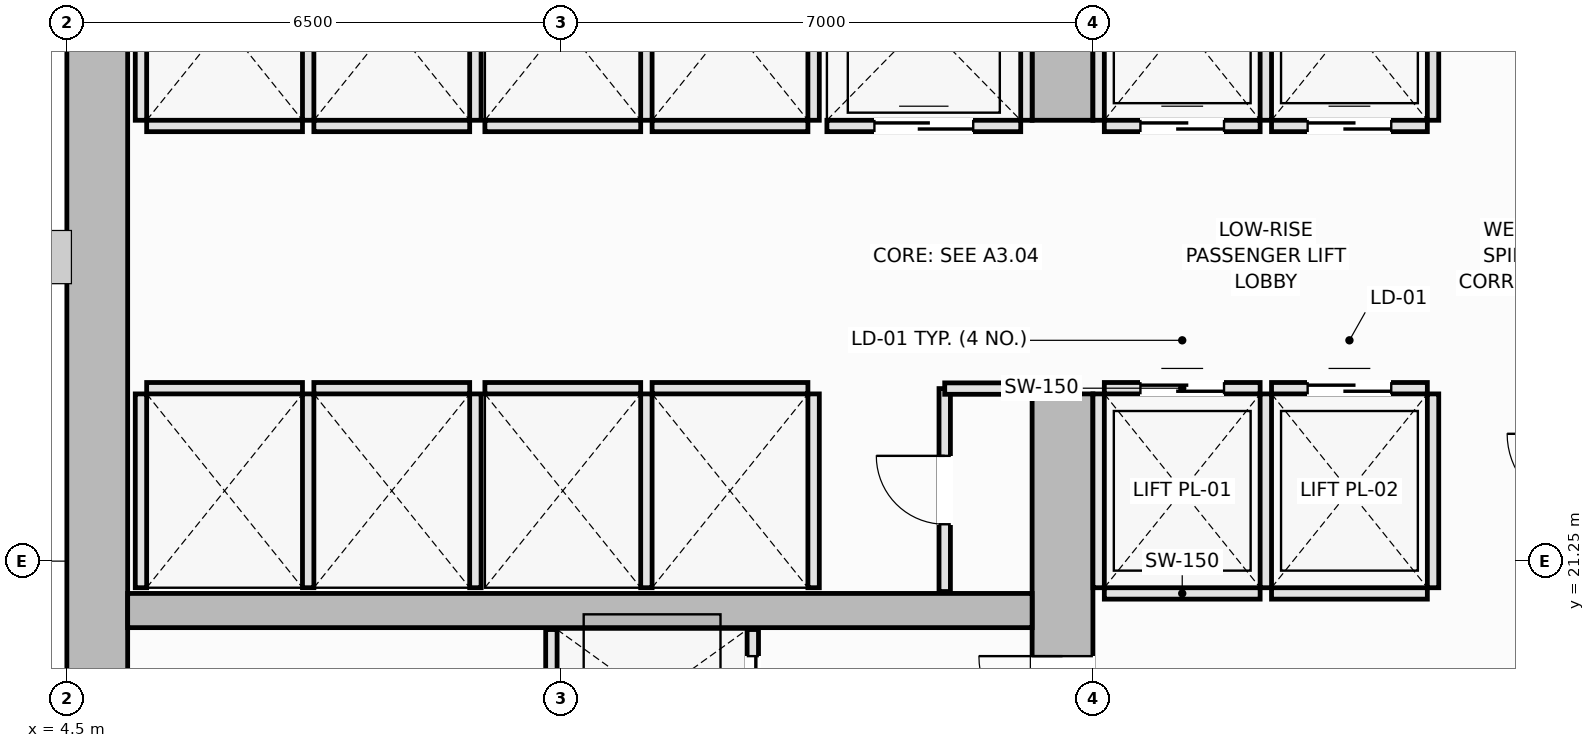
"""IFC4 building model, lengths in metres.
Left out: names, types, materials, properties, quantities, classifications, styles, units other than length and angle.
Written with IfcOpenShell. Run it as: python <this file> out.ifc"""

import sys

from ifc_helpers import new_model, si_unit, direction, frame, frame_2d, origin, place, context, subcontext, project, spatial, rectangle, extrude, element, fill, save


model = new_model("IFC4")
c1 = context("Model", 3, precision=1e-05, world=origin(), true_north=direction((0.0, 1.0)))
c2 = subcontext(c1, "Body", "Model", "MODEL_VIEW")
j1 = project(units=[si_unit("LENGTHUNIT", "METRE"), si_unit("PLANEANGLEUNIT", "RADIAN")], contexts=[c1])
p1 = place(None, origin())
s1 = spatial("IfcSite", under=j1, at=p1, CompositionType="ELEMENT")
p2 = place(p1, origin())
s2 = spatial("IfcBuilding", under=s1, at=p2, CompositionType="ELEMENT")
p3 = place(p2, frame((0.0, 0.0, 57.55)))
s3 = spatial("IfcBuildingStorey", under=s2, at=p3, CompositionType="ELEMENT", Elevation=57.55)
p4 = place(p3, frame((4.9, 14.8, 0.0), z_axis=(0.0, 0.0, 1.0), x_axis=(0.0, 1.0, 0.0)))
e1 = element("IfcWall", 1, at=p4, inside=s3, PredefinedType="SHEAR", context=c2, shape_type="SweptSolid", body=[
    extrude(rectangle(XDim=20.9, YDim=0.8, at=frame_2d((10.45, 0.0))), origin(), (0.0, 0.0, 1.0), 3.55),
])
p5 = place(p3, frame((17.6, 14.8, 0.0), z_axis=(0.0, 0.0, 1.0), x_axis=(0.0, 1.0, 0.0)))
e2 = element("IfcWall", 2, at=p5, inside=s3, PredefinedType="SHEAR", context=c2, shape_type="SweptSolid", body=[
    extrude(rectangle(XDim=8.65, YDim=0.8, at=frame_2d((4.325, 0.0))), origin(), (0.0, 0.0, 1.0), 3.55),
])
p6 = place(p5, frame((4.1, 0.0, 0.0)))
e3 = element("IfcOpeningElement", 3, at=p6, cuts=e2, PredefinedType="OPENING", context=c2, shape_type="SweptSolid", body=[
    extrude(rectangle(XDim=1.1, YDim=2.15, at=frame_2d((0.55, 1.075))), frame((0.0, 0.41, 0.0), z_axis=(0.0, -1.0, 0.0), x_axis=(1.0, 0.0, 0.0)), (0.0, 0.0, 1.0), 0.82),
])
p7 = place(p3, frame((17.6, 27.05, 0.0), z_axis=(0.0, 0.0, 1.0), x_axis=(0.0, 1.0, 0.0)))
e4 = element("IfcWall", 4, at=p7, inside=s3, PredefinedType="SHEAR", context=c2, shape_type="SweptSolid", body=[
    extrude(rectangle(XDim=8.65, YDim=0.8, at=frame_2d((4.325, 0.0))), origin(), (0.0, 0.0, 1.0), 3.55),
])
p8 = place(p7, frame((3.45, 0.0, 0.0)))
e5 = element("IfcOpeningElement", 5, at=p8, cuts=e4, PredefinedType="OPENING", context=c2, shape_type="SweptSolid", body=[
    extrude(rectangle(XDim=1.1, YDim=2.15, at=frame_2d((0.55, 1.075))), frame((0.0, 0.41, 0.0), z_axis=(0.0, -1.0, 0.0), x_axis=(1.0, 0.0, 0.0)), (0.0, 0.0, 1.0), 0.82),
])
p9 = place(p3, frame((5.3, 20.6, 0.0), z_axis=(0.0, 0.0, 1.0), x_axis=(1.0, 0.0, 0.0)))
e6 = element("IfcWall", 6, at=p9, inside=s3, PredefinedType="SHEAR", context=c2, shape_type="SweptSolid", body=[
    extrude(rectangle(XDim=11.9, YDim=0.45, at=frame_2d((5.95, 0.0))), origin(), (0.0, 0.0, 1.0), 3.55),
])
p10 = place(p3, frame((18.15, 20.825, 0.0), z_axis=(0.0, 0.0, 1.0), x_axis=(1.0, 0.0, 0.0)))
e7 = element("IfcWall", 7, at=p10, inside=s3, PredefinedType="PARTITIONING", context=c2, shape_type="SweptSolid", body=[
    extrude(rectangle(XDim=2.05, YDim=0.15, at=frame_2d((1.025, 0.0))), origin(), (0.0, 0.0, 1.0), 3.37),
])
p11 = place(p3, frame((18.15, 23.525, 0.0), z_axis=(0.0, 0.0, 1.0), x_axis=(1.0, 0.0, 0.0)))
e8 = element("IfcWall", 8, at=p11, inside=s3, PredefinedType="PARTITIONING", context=c2, shape_type="SweptSolid", body=[
    extrude(rectangle(XDim=2.05, YDim=0.15, at=frame_2d((1.025, 0.0))), origin(), (0.0, 0.0, 1.0), 3.37),
])
p12 = place(p11, frame((0.475, 0.0, 0.0)))
e9 = element("IfcOpeningElement", 9, at=p12, cuts=e8, PredefinedType="OPENING", context=c2, shape_type="SweptSolid", body=[
    extrude(rectangle(XDim=1.1, YDim=2.2, at=frame_2d((0.55, 1.1))), frame((0.0, 0.085, 0.0), z_axis=(0.0, -1.0, 0.0), x_axis=(1.0, 0.0, 0.0)), (0.0, 0.0, 1.0), 0.17),
])
for number, where, z_axis, x_axis in (
    (10, (18.075, 20.9, 0.0), (0.0, 0.0, 1.0), (0.0, 1.0, 0.0)),
    (11, (20.275, 20.9, 0.0), (0.0, 0.0, 1.0), (0.0, 1.0, 0.0)),
):
    element("IfcWall", number, at=place(p3, frame(where, z_axis=z_axis, x_axis=x_axis)), inside=s3, PredefinedType="PARTITIONING", context=c2, shape_type="SweptSolid", body=[
        extrude(rectangle(XDim=2.55, YDim=0.15, at=frame_2d((1.275, 0.0))), origin(), (0.0, 0.0, 1.0), 3.37),
    ])
p13 = place(p3, frame((20.35, 20.825, 0.0), z_axis=(0.0, 0.0, 1.0), x_axis=(1.0, 0.0, 0.0)))
e12 = element("IfcWall", 12, at=p13, inside=s3, PredefinedType="PARTITIONING", context=c2, shape_type="SweptSolid", body=[
    extrude(rectangle(XDim=2.05, YDim=0.15, at=frame_2d((1.025, 0.0))), origin(), (0.0, 0.0, 1.0), 3.37),
])
p14 = place(p3, frame((20.35, 23.525, 0.0), z_axis=(0.0, 0.0, 1.0), x_axis=(1.0, 0.0, 0.0)))
e13 = element("IfcWall", 13, at=p14, inside=s3, PredefinedType="PARTITIONING", context=c2, shape_type="SweptSolid", body=[
    extrude(rectangle(XDim=2.05, YDim=0.15, at=frame_2d((1.025, 0.0))), origin(), (0.0, 0.0, 1.0), 3.37),
])
p15 = place(p14, frame((0.475, 0.0, 0.0)))
e14 = element("IfcOpeningElement", 14, at=p15, cuts=e13, PredefinedType="OPENING", context=c2, shape_type="SweptSolid", body=[
    extrude(rectangle(XDim=1.1, YDim=2.2, at=frame_2d((0.55, 1.1))), frame((0.0, 0.085, 0.0), z_axis=(0.0, -1.0, 0.0), x_axis=(1.0, 0.0, 0.0)), (0.0, 0.0, 1.0), 0.17),
])
p16 = place(p3, frame((22.475, 20.9, 0.0), z_axis=(0.0, 0.0, 1.0), x_axis=(0.0, 1.0, 0.0)))
e15 = element("IfcWall", 15, at=p16, inside=s3, PredefinedType="PARTITIONING", context=c2, shape_type="SweptSolid", body=[
    extrude(rectangle(XDim=2.55, YDim=0.15, at=frame_2d((1.275, 0.0))), origin(), (0.0, 0.0, 1.0), 3.37),
])
p17 = place(p3, frame((18.15, 26.975, 0.0), z_axis=(0.0, 0.0, 1.0), x_axis=(1.0, 0.0, 0.0)))
e16 = element("IfcWall", 16, at=p17, inside=s3, PredefinedType="PARTITIONING", context=c2, shape_type="SweptSolid", body=[
    extrude(rectangle(XDim=2.05, YDim=0.15, at=frame_2d((1.025, 0.0))), origin(), (0.0, 0.0, 1.0), 3.37),
])
p18 = place(p17, frame((0.475, 0.0, 0.0)))
e17 = element("IfcOpeningElement", 17, at=p18, cuts=e16, PredefinedType="OPENING", context=c2, shape_type="SweptSolid", body=[
    extrude(rectangle(XDim=1.1, YDim=2.2, at=frame_2d((0.55, 1.1))), frame((0.0, 0.085, 0.0), z_axis=(0.0, -1.0, 0.0), x_axis=(1.0, 0.0, 0.0)), (0.0, 0.0, 1.0), 0.17),
])
for number, where, z_axis, x_axis in (
    (18, (18.075, 27.05, 0.0), (0.0, 0.0, 1.0), (0.0, 1.0, 0.0)),
    (19, (20.275, 27.05, 0.0), (0.0, 0.0, 1.0), (0.0, 1.0, 0.0)),
):
    element("IfcWall", number, at=place(p3, frame(where, z_axis=z_axis, x_axis=x_axis)), inside=s3, PredefinedType="PARTITIONING", context=c2, shape_type="SweptSolid", body=[
        extrude(rectangle(XDim=2.55, YDim=0.15, at=frame_2d((1.275, 0.0))), origin(), (0.0, 0.0, 1.0), 3.37),
    ])
p19 = place(p3, frame((20.35, 26.975, 0.0), z_axis=(0.0, 0.0, 1.0), x_axis=(1.0, 0.0, 0.0)))
e20 = element("IfcWall", 20, at=p19, inside=s3, PredefinedType="PARTITIONING", context=c2, shape_type="SweptSolid", body=[
    extrude(rectangle(XDim=2.05, YDim=0.15, at=frame_2d((1.025, 0.0))), origin(), (0.0, 0.0, 1.0), 3.37),
])
p20 = place(p19, frame((0.475, 0.0, 0.0)))
e21 = element("IfcOpeningElement", 21, at=p20, cuts=e20, PredefinedType="OPENING", context=c2, shape_type="SweptSolid", body=[
    extrude(rectangle(XDim=1.1, YDim=2.2, at=frame_2d((0.55, 1.1))), frame((0.0, 0.085, 0.0), z_axis=(0.0, -1.0, 0.0), x_axis=(1.0, 0.0, 0.0)), (0.0, 0.0, 1.0), 0.17),
])
p21 = place(p3, frame((22.475, 27.05, 0.0), z_axis=(0.0, 0.0, 1.0), x_axis=(0.0, 1.0, 0.0)))
e22 = element("IfcWall", 22, at=p21, inside=s3, PredefinedType="PARTITIONING", context=c2, shape_type="SweptSolid", body=[
    extrude(rectangle(XDim=2.55, YDim=0.15, at=frame_2d((1.275, 0.0))), origin(), (0.0, 0.0, 1.0), 3.37),
])
p22 = place(p3, frame((5.55, 23.525, 0.0), z_axis=(0.0, 0.0, 1.0), x_axis=(1.0, 0.0, 0.0)))
e23 = element("IfcWall", 23, at=p22, inside=s3, PredefinedType="PARTITIONING", context=c2, shape_type="SweptSolid", body=[
    extrude(rectangle(XDim=2.05, YDim=0.15, at=frame_2d((1.025, 0.0))), origin(), (0.0, 0.0, 1.0), 3.37),
])
for number, where, z_axis, x_axis in (
    (24, (5.475, 20.9, 0.0), (0.0, 0.0, 1.0), (0.0, 1.0, 0.0)),
    (25, (7.675, 20.9, 0.0), (0.0, 0.0, 1.0), (0.0, 1.0, 0.0)),
):
    element("IfcWall", number, at=place(p3, frame(where, z_axis=z_axis, x_axis=x_axis)), inside=s3, PredefinedType="PARTITIONING", context=c2, shape_type="SweptSolid", body=[
        extrude(rectangle(XDim=2.55, YDim=0.15, at=frame_2d((1.275, 0.0))), origin(), (0.0, 0.0, 1.0), 3.37),
    ])
p23 = place(p3, frame((7.75, 23.525, 0.0), z_axis=(0.0, 0.0, 1.0), x_axis=(1.0, 0.0, 0.0)))
e26 = element("IfcWall", 26, at=p23, inside=s3, PredefinedType="PARTITIONING", context=c2, shape_type="SweptSolid", body=[
    extrude(rectangle(XDim=2.05, YDim=0.15, at=frame_2d((1.025, 0.0))), origin(), (0.0, 0.0, 1.0), 3.37),
])
p24 = place(p3, frame((9.875, 20.9, 0.0), z_axis=(0.0, 0.0, 1.0), x_axis=(0.0, 1.0, 0.0)))
e27 = element("IfcWall", 27, at=p24, inside=s3, PredefinedType="PARTITIONING", context=c2, shape_type="SweptSolid", body=[
    extrude(rectangle(XDim=2.55, YDim=0.15, at=frame_2d((1.275, 0.0))), origin(), (0.0, 0.0, 1.0), 3.37),
])
p25 = place(p3, frame((5.55, 26.975, 0.0), z_axis=(0.0, 0.0, 1.0), x_axis=(1.0, 0.0, 0.0)))
e28 = element("IfcWall", 28, at=p25, inside=s3, PredefinedType="PARTITIONING", context=c2, shape_type="SweptSolid", body=[
    extrude(rectangle(XDim=2.05, YDim=0.15, at=frame_2d((1.025, 0.0))), origin(), (0.0, 0.0, 1.0), 3.37),
])
for number, where, z_axis, x_axis in (
    (29, (5.475, 27.05, 0.0), (0.0, 0.0, 1.0), (0.0, 1.0, 0.0)),
    (30, (7.675, 27.05, 0.0), (0.0, 0.0, 1.0), (0.0, 1.0, 0.0)),
):
    element("IfcWall", number, at=place(p3, frame(where, z_axis=z_axis, x_axis=x_axis)), inside=s3, PredefinedType="PARTITIONING", context=c2, shape_type="SweptSolid", body=[
        extrude(rectangle(XDim=2.55, YDim=0.15, at=frame_2d((1.275, 0.0))), origin(), (0.0, 0.0, 1.0), 3.37),
    ])
p26 = place(p3, frame((7.75, 26.975, 0.0), z_axis=(0.0, 0.0, 1.0), x_axis=(1.0, 0.0, 0.0)))
e31 = element("IfcWall", 31, at=p26, inside=s3, PredefinedType="PARTITIONING", context=c2, shape_type="SweptSolid", body=[
    extrude(rectangle(XDim=2.05, YDim=0.15, at=frame_2d((1.025, 0.0))), origin(), (0.0, 0.0, 1.0), 3.37),
])
p27 = place(p3, frame((9.875, 27.05, 0.0), z_axis=(0.0, 0.0, 1.0), x_axis=(0.0, 1.0, 0.0)))
e32 = element("IfcWall", 32, at=p27, inside=s3, PredefinedType="PARTITIONING", context=c2, shape_type="SweptSolid", body=[
    extrude(rectangle(XDim=2.55, YDim=0.15, at=frame_2d((1.275, 0.0))), origin(), (0.0, 0.0, 1.0), 3.37),
])
p28 = place(p3, frame((10.0, 23.525, 0.0), z_axis=(0.0, 0.0, 1.0), x_axis=(1.0, 0.0, 0.0)))
e33 = element("IfcWall", 33, at=p28, inside=s3, PredefinedType="PARTITIONING", context=c2, shape_type="SweptSolid", body=[
    extrude(rectangle(XDim=2.05, YDim=0.15, at=frame_2d((1.025, 0.0))), origin(), (0.0, 0.0, 1.0), 3.37),
])
p29 = place(p3, frame((12.125, 20.9, 0.0), z_axis=(0.0, 0.0, 1.0), x_axis=(0.0, 1.0, 0.0)))
e34 = element("IfcWall", 34, at=p29, inside=s3, PredefinedType="PARTITIONING", context=c2, shape_type="SweptSolid", body=[
    extrude(rectangle(XDim=2.55, YDim=0.15, at=frame_2d((1.275, 0.0))), origin(), (0.0, 0.0, 1.0), 3.37),
])
p30 = place(p3, frame((12.2, 23.525, 0.0), z_axis=(0.0, 0.0, 1.0), x_axis=(1.0, 0.0, 0.0)))
e35 = element("IfcWall", 35, at=p30, inside=s3, PredefinedType="PARTITIONING", context=c2, shape_type="SweptSolid", body=[
    extrude(rectangle(XDim=2.05, YDim=0.15, at=frame_2d((1.025, 0.0))), origin(), (0.0, 0.0, 1.0), 3.37),
])
p31 = place(p3, frame((14.325, 20.9, 0.0), z_axis=(0.0, 0.0, 1.0), x_axis=(0.0, 1.0, 0.0)))
e36 = element("IfcWall", 36, at=p31, inside=s3, PredefinedType="PARTITIONING", context=c2, shape_type="SweptSolid", body=[
    extrude(rectangle(XDim=2.55, YDim=0.15, at=frame_2d((1.275, 0.0))), origin(), (0.0, 0.0, 1.0), 3.37),
])
p32 = place(p3, frame((10.0, 26.975, 0.0), z_axis=(0.0, 0.0, 1.0), x_axis=(1.0, 0.0, 0.0)))
e37 = element("IfcWall", 37, at=p32, inside=s3, PredefinedType="PARTITIONING", context=c2, shape_type="SweptSolid", body=[
    extrude(rectangle(XDim=2.05, YDim=0.15, at=frame_2d((1.025, 0.0))), origin(), (0.0, 0.0, 1.0), 3.37),
])
p33 = place(p3, frame((12.125, 27.05, 0.0), z_axis=(0.0, 0.0, 1.0), x_axis=(0.0, 1.0, 0.0)))
e38 = element("IfcWall", 38, at=p33, inside=s3, PredefinedType="PARTITIONING", context=c2, shape_type="SweptSolid", body=[
    extrude(rectangle(XDim=2.55, YDim=0.15, at=frame_2d((1.275, 0.0))), origin(), (0.0, 0.0, 1.0), 3.37),
])
p34 = place(p3, frame((12.2, 26.975, 0.0), z_axis=(0.0, 0.0, 1.0), x_axis=(1.0, 0.0, 0.0)))
e39 = element("IfcWall", 39, at=p34, inside=s3, PredefinedType="PARTITIONING", context=c2, shape_type="SweptSolid", body=[
    extrude(rectangle(XDim=2.05, YDim=0.15, at=frame_2d((1.025, 0.0))), origin(), (0.0, 0.0, 1.0), 3.37),
])
p35 = place(p3, frame((14.325, 27.05, 0.0), z_axis=(0.0, 0.0, 1.0), x_axis=(0.0, 1.0, 0.0)))
e40 = element("IfcWall", 40, at=p35, inside=s3, PredefinedType="PARTITIONING", context=c2, shape_type="SweptSolid", body=[
    extrude(rectangle(XDim=2.55, YDim=0.15, at=frame_2d((1.275, 0.0))), origin(), (0.0, 0.0, 1.0), 3.37),
])
p36 = place(p3, frame((14.5, 26.975, 0.0), z_axis=(0.0, 0.0, 1.0), x_axis=(1.0, 0.0, 0.0)))
e41 = element("IfcWall", 41, at=p36, inside=s3, PredefinedType="PARTITIONING", context=c2, shape_type="SweptSolid", body=[
    extrude(rectangle(XDim=2.55, YDim=0.15, at=frame_2d((1.275, 0.0))), origin(), (0.0, 0.0, 1.0), 3.37),
])
p37 = place(p36, frame((0.625, 0.0, 0.0)))
e42 = element("IfcOpeningElement", 42, at=p37, cuts=e41, PredefinedType="OPENING", context=c2, shape_type="SweptSolid", body=[
    extrude(rectangle(XDim=1.3, YDim=2.2, at=frame_2d((0.65, 1.1))), frame((0.0, 0.085, 0.0), z_axis=(0.0, -1.0, 0.0), x_axis=(1.0, 0.0, 0.0)), (0.0, 0.0, 1.0), 0.17),
])
p38 = place(p3, frame((17.125, 27.05, 0.0), z_axis=(0.0, 0.0, 1.0), x_axis=(0.0, 1.0, 0.0)))
e43 = element("IfcWall", 43, at=p38, inside=s3, PredefinedType="PARTITIONING", context=c2, shape_type="SweptSolid", body=[
    extrude(rectangle(XDim=2.6, YDim=0.15, at=frame_2d((1.3, 0.0))), origin(), (0.0, 0.0, 1.0), 3.37),
])
p39 = place(p3, frame((10.875, 18.55, 0.0), z_axis=(0.0, 0.0, 1.0), x_axis=(0.0, 1.0, 0.0)))
e44 = element("IfcWall", 44, at=p39, inside=s3, PredefinedType="PARTITIONING", context=c2, shape_type="SweptSolid", body=[
    extrude(rectangle(XDim=1.8, YDim=0.15, at=frame_2d((0.9, 0.0))), origin(), (0.0, 0.0, 1.0), 3.37),
])
p40 = place(p3, frame((13.525, 18.55, 0.0), z_axis=(0.0, 0.0, 1.0), x_axis=(0.0, 1.0, 0.0)))
e45 = element("IfcWall", 45, at=p40, inside=s3, PredefinedType="PARTITIONING", context=c2, shape_type="SweptSolid", body=[
    extrude(rectangle(XDim=1.8, YDim=0.15, at=frame_2d((0.9, 0.0))), origin(), (0.0, 0.0, 1.0), 3.37),
])
p41 = place(p40, frame((0.35, 0.0, 0.0)))
e46 = element("IfcOpeningElement", 46, at=p41, cuts=e45, PredefinedType="OPENING", context=c2, shape_type="SweptSolid", body=[
    extrude(rectangle(XDim=1.1, YDim=2.2, at=frame_2d((0.55, 1.1))), frame((0.0, 0.085, 0.0), z_axis=(0.0, -1.0, 0.0), x_axis=(1.0, 0.0, 0.0)), (0.0, 0.0, 1.0), 0.17),
])
p42 = place(p3, frame((16.05, 20.85, 0.0), z_axis=(0.0, 0.0, 1.0), x_axis=(0.0, 1.0, 0.0)))
e47 = element("IfcWall", 47, at=p42, inside=s3, PredefinedType="PARTITIONING", context=c2, shape_type="SweptSolid", body=[
    extrude(rectangle(XDim=2.67, YDim=0.15, at=frame_2d((1.335, 0.0))), origin(), (0.0, 0.0, 1.0), 3.37),
])
p43 = place(p42, frame((0.885, 0.0, 0.0)))
e48 = element("IfcOpeningElement", 48, at=p43, cuts=e47, PredefinedType="OPENING", context=c2, shape_type="SweptSolid", body=[
    extrude(rectangle(XDim=0.9, YDim=2.1, at=frame_2d((0.45, 1.05))), frame((0.0, 0.085, 0.0), z_axis=(0.0, -1.0, 0.0), x_axis=(1.0, 0.0, 0.0)), (0.0, 0.0, 1.0), 0.17),
])
p44 = place(p3, frame((16.05, 23.52, 0.0), z_axis=(0.0, 0.0, 1.0), x_axis=(1.0, 0.0, 0.0)))
e49 = element("IfcWall", 49, at=p44, inside=s3, PredefinedType="PARTITIONING", context=c2, shape_type="SweptSolid", body=[
    extrude(rectangle(XDim=1.17, YDim=0.15, at=frame_2d((0.585, 0.0))), origin(), (0.0, 0.0, 1.0), 3.37),
])
p45 = place(p12, origin())
e50 = element("IfcDoor", 50, at=p45, inside=s3, OperationType="DOUBLE_DOOR_SLIDING", PredefinedType="DOOR", context=c2, shape_type="SweptSolid", body=[
    extrude(rectangle(XDim=1.1, YDim=2.2, at=frame_2d((0.55, 1.1))), frame((0.0, 0.025, 0.0), z_axis=(0.0, -1.0, 0.0), x_axis=(1.0, 0.0, 0.0)), (0.0, 0.0, 1.0), 0.05),
])
fill(e9, e50)
p46 = place(p15, origin())
e51 = element("IfcDoor", 51, at=p46, inside=s3, OperationType="DOUBLE_DOOR_SLIDING", PredefinedType="DOOR", context=c2, shape_type="SweptSolid", body=[
    extrude(rectangle(XDim=1.1, YDim=2.2, at=frame_2d((0.55, 1.1))), frame((0.0, 0.025, 0.0), z_axis=(0.0, -1.0, 0.0), x_axis=(1.0, 0.0, 0.0)), (0.0, 0.0, 1.0), 0.05),
])
fill(e14, e51)
p47 = place(p18, origin())
e52 = element("IfcDoor", 52, at=p47, inside=s3, OperationType="DOUBLE_DOOR_SLIDING", PredefinedType="DOOR", context=c2, shape_type="SweptSolid", body=[
    extrude(rectangle(XDim=1.1, YDim=2.2, at=frame_2d((0.55, 1.1))), frame((0.0, 0.025, 0.0), z_axis=(0.0, -1.0, 0.0), x_axis=(1.0, 0.0, 0.0)), (0.0, 0.0, 1.0), 0.05),
])
fill(e17, e52)
p48 = place(p20, origin())
e53 = element("IfcDoor", 53, at=p48, inside=s3, OperationType="DOUBLE_DOOR_SLIDING", PredefinedType="DOOR", context=c2, shape_type="SweptSolid", body=[
    extrude(rectangle(XDim=1.1, YDim=2.2, at=frame_2d((0.55, 1.1))), frame((0.0, 0.025, 0.0), z_axis=(0.0, -1.0, 0.0), x_axis=(1.0, 0.0, 0.0)), (0.0, 0.0, 1.0), 0.05),
])
fill(e21, e53)
p49 = place(p37, origin())
e54 = element("IfcDoor", 54, at=p49, inside=s3, OperationType="DOUBLE_DOOR_SLIDING", PredefinedType="DOOR", context=c2, shape_type="SweptSolid", body=[
    extrude(rectangle(XDim=1.3, YDim=2.2, at=frame_2d((0.65, 1.1))), frame((0.0, 0.025, 0.0), z_axis=(0.0, -1.0, 0.0), x_axis=(1.0, 0.0, 0.0)), (0.0, 0.0, 1.0), 0.05),
])
fill(e42, e54)
p50 = place(p41, origin())
e55 = element("IfcDoor", 55, at=p50, inside=s3, OperationType="DOUBLE_DOOR_SLIDING", PredefinedType="DOOR", context=c2, shape_type="SweptSolid", body=[
    extrude(rectangle(XDim=1.1, YDim=2.2, at=frame_2d((0.55, 1.1))), frame((0.0, 0.025, 0.0), z_axis=(0.0, -1.0, 0.0), x_axis=(1.0, 0.0, 0.0)), (0.0, 0.0, 1.0), 0.05),
])
fill(e46, e55)
p51 = place(p6, origin())
e56 = element("IfcDoor", 56, at=p51, inside=s3, OperationType="SINGLE_SWING_RIGHT", PredefinedType="DOOR", context=c2, shape_type="SweptSolid", body=[
    extrude(rectangle(XDim=1.1, YDim=2.15, at=frame_2d((0.55, 1.075))), frame((0.0, 0.025, 0.0), z_axis=(0.0, -1.0, 0.0), x_axis=(1.0, 0.0, 0.0)), (0.0, 0.0, 1.0), 0.05),
])
fill(e3, e56)
p52 = place(p43, origin())
e57 = element("IfcDoor", 57, at=p52, inside=s3, OperationType="SINGLE_SWING_RIGHT", PredefinedType="DOOR", context=c2, shape_type="SweptSolid", body=[
    extrude(rectangle(XDim=0.9, YDim=2.1, at=frame_2d((0.45, 1.05))), frame((0.0, 0.025, 0.0), z_axis=(0.0, -1.0, 0.0), x_axis=(1.0, 0.0, 0.0)), (0.0, 0.0, 1.0), 0.05),
])
fill(e48, e57)
save(model, sys.argv[1])
